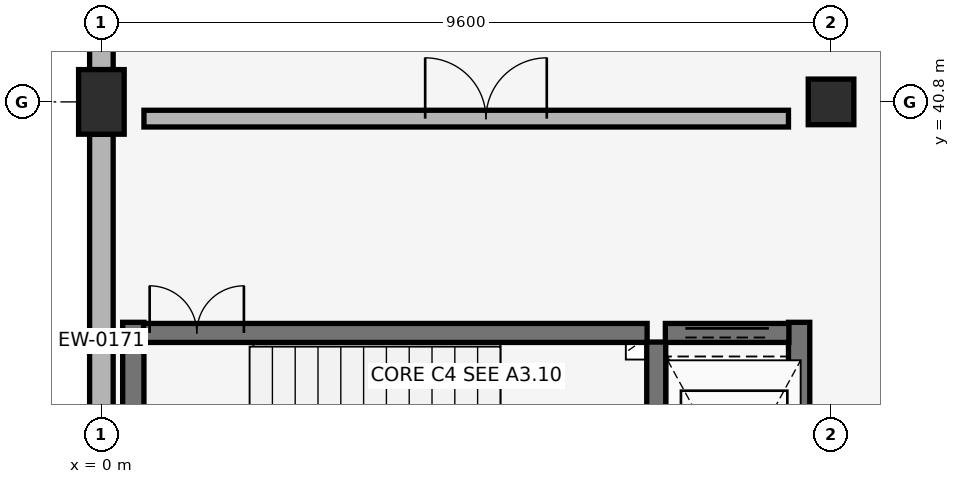
"""IFC4 building model, lengths in metres.
Left out: names, types, materials, properties, quantities, classifications, styles, units other than length and angle.
Written with IfcOpenShell. Run it as: python <this file> out.ifc"""

import sys

from ifc_helpers import new_model, si_unit, direction, frame, frame_2d, origin, origin_2d, place, context, subcontext, project, spatial, rectangle, extrude, element, fill, save


model = new_model("IFC4")
c1 = context("Model", 3, precision=1e-05, world=origin(), true_north=direction((0.0, 1.0)))
c2 = subcontext(c1, "Body", "Model", "MODEL_VIEW")
j1 = project(units=[si_unit("LENGTHUNIT", "METRE"), si_unit("PLANEANGLEUNIT", "RADIAN")], contexts=[c1])
p1 = place(None, origin())
s1 = spatial("IfcSite", under=j1, at=p1, CompositionType="ELEMENT")
p2 = place(p1, origin())
s2 = spatial("IfcBuilding", under=s1, at=p2, CompositionType="ELEMENT")
p3 = place(p2, frame((0.0, 0.0, 8.5)))
s3 = spatial("IfcBuildingStorey", under=s2, at=p3, CompositionType="ELEMENT", Elevation=8.5)
p4 = place(p3, frame((0.0, 40.8, 0.0), z_axis=(0.0, 0.0, 1.0), x_axis=(1.0, 0.0, 0.0)))
e1 = element("IfcColumn", 1, at=p4, inside=s3, PredefinedType="COLUMN", context=c2, shape_type="SweptSolid", body=[
    extrude(rectangle(XDim=0.6, YDim=0.85, at=origin_2d()), origin(), (0.0, 0.0, 1.0), 4.08),
])
p5 = place(p3, frame((9.6, 40.8, 0.0), z_axis=(0.0, 0.0, 1.0), x_axis=(1.0, 0.0, 0.0)))
e2 = element("IfcColumn", 2, at=p5, inside=s3, PredefinedType="COLUMN", context=c2, shape_type="SweptSolid", body=[
    extrude(rectangle(XDim=0.6, YDim=0.6, at=origin_2d()), origin(), (0.0, 0.0, 1.0), 4.08),
])
p6 = place(p3, frame((0.0, 40.375, 0.0), z_axis=(0.0, 0.0, 1.0), x_axis=(0.0, -1.0, 0.0)))
e3 = element("IfcWall", 3, at=p6, inside=s3, PredefinedType="SOLIDWALL", context=c2, shape_type="SweptSolid", body=[
    extrude(rectangle(XDim=6.35, YDim=0.31, at=frame_2d((3.175, 0.0))), origin(), (0.0, 0.0, 1.0), 3.06),
])
p7 = place(p3, frame((0.0, 47.575, 0.0), z_axis=(0.0, 0.0, 1.0), x_axis=(0.0, -1.0, 0.0)))
e4 = element("IfcWall", 4, at=p7, inside=s3, PredefinedType="SOLIDWALL", context=c2, shape_type="SweptSolid", body=[
    extrude(rectangle(XDim=6.35, YDim=0.31, at=frame_2d((3.175, 0.0))), origin(), (0.0, 0.0, 1.0), 3.06),
])
for number, where, z_axis, x_axis in (
    (5, (0.42, 33.82, 0.0), (0.0, 0.0, 1.0), (0.0, 1.0, 0.0)),
    (6, (9.18, 33.82, 0.0), (0.0, 0.0, 1.0), (0.0, 1.0, 0.0)),
):
    element("IfcWall", number, at=place(p3, frame(where, z_axis=z_axis, x_axis=x_axis)), inside=s3, PredefinedType="SHEAR", context=c2, shape_type="SweptSolid", body=[
        extrude(rectangle(XDim=4.08, YDim=0.28, at=frame_2d((2.04, 0.0))), origin(), (0.0, 0.0, 1.0), 3.78),
    ])
p8 = place(p3, frame((7.3, 34.1, 0.0), z_axis=(0.0, 0.0, 1.0), x_axis=(0.0, 1.0, 0.0)))
e7 = element("IfcWall", 7, at=p8, inside=s3, PredefinedType="SHEAR", context=c2, shape_type="SweptSolid", body=[
    extrude(rectangle(XDim=3.54, YDim=0.25, at=frame_2d((1.77, 0.0))), origin(), (0.0, 0.0, 1.0), 3.78),
])
p9 = place(p3, frame((0.555, 37.76, 0.0), z_axis=(0.0, 0.0, 1.0), x_axis=(1.0, 0.0, 0.0)))
e8 = element("IfcWall", 8, at=p9, inside=s3, PredefinedType="SHEAR", context=c2, shape_type="SweptSolid", body=[
    extrude(rectangle(XDim=6.625, YDim=0.25, at=frame_2d((3.312, 0.0))), origin(), (0.0, 0.0, 1.0), 3.78),
])
p10 = place(p9, frame((0.08, 0.0, 0.0)))
e9 = element("IfcOpeningElement", 9, at=p10, cuts=e8, PredefinedType="OPENING", context=c2, shape_type="SweptSolid", body=[
    extrude(rectangle(XDim=1.24, YDim=2.15, at=frame_2d((0.62, 1.075))), frame((0.0, 0.135, 0.0), z_axis=(0.0, -1.0, 0.0), x_axis=(1.0, 0.0, 0.0)), (0.0, 0.0, 1.0), 0.27),
])
p11 = place(p3, frame((0.56, 40.58, 0.0), z_axis=(0.0, 0.0, 1.0), x_axis=(1.0, 0.0, 0.0)))
e10 = element("IfcWall", 10, at=p11, inside=s3, PredefinedType="PARTITIONING", context=c2, shape_type="SweptSolid", body=[
    extrude(rectangle(XDim=8.48, YDim=0.22, at=frame_2d((4.24, 0.0))), origin(), (0.0, 0.0, 1.0), 3.11),
])
p12 = place(p11, frame((3.7, 0.0, 0.0)))
e11 = element("IfcOpeningElement", 11, at=p12, cuts=e10, PredefinedType="OPENING", context=c2, shape_type="SweptSolid", body=[
    extrude(rectangle(XDim=1.6, YDim=2.2, at=frame_2d((0.8, 1.1))), frame((0.0, 0.12, 0.0), z_axis=(0.0, -1.0, 0.0), x_axis=(1.0, 0.0, 0.0)), (0.0, 0.0, 1.0), 0.24),
])
p13 = place(p3, frame((7.42, 37.76, 0.0), z_axis=(0.0, 0.0, 1.0), x_axis=(1.0, 0.0, 0.0)))
e12 = element("IfcWall", 12, at=p13, inside=s3, PredefinedType="SHEAR", context=c2, shape_type="SweptSolid", body=[
    extrude(rectangle(XDim=1.625, YDim=0.25, at=frame_2d((0.812, 0.0))), origin(), (0.0, 0.0, 1.0), 3.78),
])
p14 = place(p13, frame((0.262, 0.0, 0.0)))
e13 = element("IfcOpeningElement", 13, at=p14, cuts=e12, PredefinedType="OPENING", context=c2, shape_type="SweptSolid", body=[
    extrude(rectangle(XDim=1.1, YDim=2.15, at=frame_2d((0.55, 1.075))), frame((0.0, 0.135, 0.0), z_axis=(0.0, -1.0, 0.0), x_axis=(1.0, 0.0, 0.0)), (0.0, 0.0, 1.0), 0.27),
])
p15 = place(p10, origin())
e14 = element("IfcDoor", 14, at=p15, inside=s3, OperationType="DOUBLE_DOOR_SINGLE_SWING", PredefinedType="DOOR", context=c2, shape_type="SweptSolid", body=[
    extrude(rectangle(XDim=1.24, YDim=2.15, at=frame_2d((0.62, 1.075))), frame((0.0, 0.025, 0.0), z_axis=(0.0, -1.0, 0.0), x_axis=(1.0, 0.0, 0.0)), (0.0, 0.0, 1.0), 0.05),
])
fill(e9, e14)
p16 = place(p12, origin())
e15 = element("IfcDoor", 15, at=p16, inside=s3, OperationType="DOUBLE_DOOR_SINGLE_SWING", PredefinedType="DOOR", context=c2, shape_type="SweptSolid", body=[
    extrude(rectangle(XDim=1.6, YDim=2.2, at=frame_2d((0.8, 1.1))), frame((0.0, 0.025, 0.0), z_axis=(0.0, -1.0, 0.0), x_axis=(1.0, 0.0, 0.0)), (0.0, 0.0, 1.0), 0.05),
])
fill(e11, e15)
p17 = place(p14, origin())
e16 = element("IfcDoor", 16, at=p17, inside=s3, OperationType="DOUBLE_DOOR_SLIDING", PredefinedType="DOOR", context=c2, shape_type="SweptSolid", body=[
    extrude(rectangle(XDim=1.1, YDim=2.15, at=frame_2d((0.55, 1.075))), frame((0.0, 0.025, 0.0), z_axis=(0.0, -1.0, 0.0), x_axis=(1.0, 0.0, 0.0)), (0.0, 0.0, 1.0), 0.05),
])
fill(e13, e16)
save(model, sys.argv[1])
